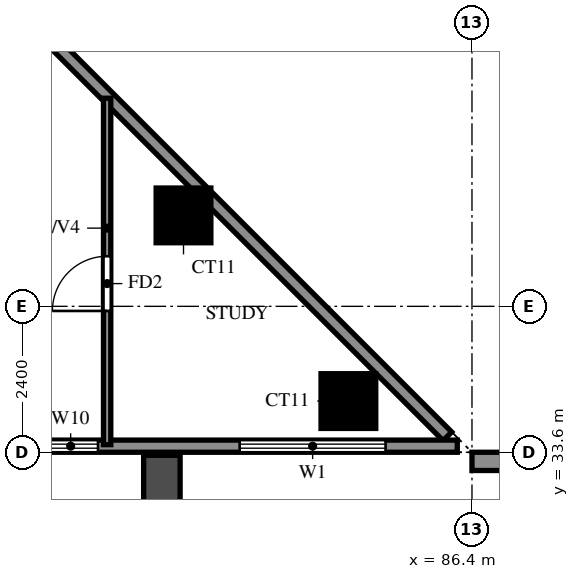
"""IFC4 building model, lengths in metres.
Left out: names, types, materials, properties, quantities, classifications, styles, units other than length and angle.
Written with IfcOpenShell. Run it as: python <this file> out.ifc"""

import sys

from ifc_helpers import new_model, si_unit, direction, frame, frame_2d, origin, origin_2d, place, context, subcontext, project, spatial, rectangle, extrude, source, transform, mapped, element, fill, save


model = new_model("IFC4")
c1 = context("Model", 3, precision=1e-05, world=origin(), true_north=direction((0.0, 1.0)))
c2 = subcontext(c1, "Body", "Model", "MODEL_VIEW")
j1 = project(units=[si_unit("LENGTHUNIT", "METRE"), si_unit("PLANEANGLEUNIT", "RADIAN")], contexts=[c1])
p1 = place(None, origin())
s1 = spatial("IfcSite", under=j1, at=p1, CompositionType="ELEMENT")
p2 = place(p1, origin())
s2 = spatial("IfcBuilding", under=s1, at=p2, CompositionType="ELEMENT")
p3 = place(p2, frame((0.0, 0.0, 100.5)))
s3 = spatial("IfcBuildingStorey", under=s2, at=p3, CompositionType="ELEMENT", Elevation=100.5)
m1 = source(origin(), c2, "Body", "SweptSolid", [
    extrude(rectangle(XDim=0.9, YDim=0.9, at=origin_2d()), origin(), (0.0, 0.0, 1.0), 3.18),
])
for number, where, z_axis, x_axis in (
    (1, (84.367, 34.442, 0.0), (0.0, 0.0, 1.0), (1.0, 0.0, 0.0)),
    (2, (81.656, 37.496, 0.0), (0.0, 0.0, 1.0), (1.0, 0.0, 0.0)),
):
    element("IfcColumn", number, at=place(p3, frame(where, z_axis=z_axis, x_axis=x_axis)), inside=s3, PredefinedType="COLUMN", context=c2, shape_type="MappedRepresentation", body=[
        mapped(m1, transform((0.0, 0.0, 0.0))),
    ])
p4 = place(p3, frame((85.996, 33.863, 0.0), z_axis=(0.0, 0.0, 1.0), x_axis=(-0.707100718496, 0.707112843825, 0.0)))
e3 = element("IfcWall", 3, at=p4, inside=s3, PredefinedType="SOLIDWALL", context=c2, shape_type="SweptSolid", body=[
    extrude(rectangle(XDim=20.135, YDim=0.2, at=frame_2d((10.067, 0.0))), origin(), (0.0, 0.0, 1.0), 3.18),
])
p5 = place(p3, frame((58.8, 33.7, 0.0), z_axis=(0.0, 0.0, 1.0), x_axis=(1.0, 0.0, 0.0)))
e4 = element("IfcWall", 4, at=p5, inside=s3, PredefinedType="SOLIDWALL", context=c2, shape_type="SweptSolid", body=[
    extrude(rectangle(XDim=27.359, YDim=0.2, at=frame_2d((13.679, 0.0))), origin(), (0.0, 0.0, 1.0), 3.18),
])
p6 = place(p5, frame((3.3, 0.0, 0.0)))
e5 = element("IfcOpeningElement", 5, at=p6, cuts=e4, PredefinedType="OPENING", context=c2, shape_type="SweptSolid", body=[
    extrude(rectangle(XDim=1.8, YDim=2.4, at=frame_2d((0.9, 1.2))), frame((0.0, 0.11, 0.0), z_axis=(0.0, -1.0, 0.0), x_axis=(1.0, 0.0, 0.0)), (0.0, 0.0, 1.0), 0.22),
])
p7 = place(p5, frame((18.3, 0.0, 0.0)))
e6 = element("IfcOpeningElement", 6, at=p7, cuts=e4, PredefinedType="OPENING", context=c2, shape_type="SweptSolid", body=[
    extrude(rectangle(XDim=1.8, YDim=2.4, at=frame_2d((0.9, 1.2))), frame((0.0, 0.11, 0.0), z_axis=(0.0, -1.0, 0.0), x_axis=(1.0, 0.0, 0.0)), (0.0, 0.0, 1.0), 0.22),
])
p8 = place(p5, frame((10.0, 0.0, 0.6)))
e7 = element("IfcOpeningElement", 7, at=p8, cuts=e4, PredefinedType="OPENING", context=c2, shape_type="SweptSolid", body=[
    extrude(rectangle(XDim=2.4, YDim=2.4, at=frame_2d((1.2, 1.2))), frame((0.0, 0.11, 0.0), z_axis=(0.0, -1.0, 0.0), x_axis=(1.0, 0.0, 0.0)), (0.0, 0.0, 1.0), 0.22),
])
p9 = place(p5, frame((6.65, 0.0, 1.5)))
e8 = element("IfcOpeningElement", 8, at=p9, cuts=e4, PredefinedType="OPENING", context=c2, shape_type="SweptSolid", body=[
    extrude(rectangle(XDim=0.9, YDim=0.9, at=frame_2d((0.45, 0.45))), frame((0.0, 0.11, 0.0), z_axis=(0.0, -1.0, 0.0), x_axis=(1.0, 0.0, 0.0)), (0.0, 0.0, 1.0), 0.22),
])
p10 = place(p5, frame((8.55, 0.0, 1.5)))
e9 = element("IfcOpeningElement", 9, at=p10, cuts=e4, PredefinedType="OPENING", context=c2, shape_type="SweptSolid", body=[
    extrude(rectangle(XDim=0.9, YDim=0.9, at=frame_2d((0.45, 0.45))), frame((0.0, 0.11, 0.0), z_axis=(0.0, -1.0, 0.0), x_axis=(1.0, 0.0, 0.0)), (0.0, 0.0, 1.0), 0.22),
])
p11 = place(p5, frame((1.95, 0.0, 0.6)))
e10 = element("IfcOpeningElement", 10, at=p11, cuts=e4, PredefinedType="OPENING", context=c2, shape_type="SweptSolid", body=[
    extrude(rectangle(XDim=0.9, YDim=2.4, at=frame_2d((0.45, 1.2))), frame((0.0, 0.11, 0.0), z_axis=(0.0, -1.0, 0.0), x_axis=(1.0, 0.0, 0.0)), (0.0, 0.0, 1.0), 0.22),
])
p12 = place(p5, frame((14.0, 0.0, 0.6)))
e11 = element("IfcOpeningElement", 11, at=p12, cuts=e4, PredefinedType="OPENING", context=c2, shape_type="SweptSolid", body=[
    extrude(rectangle(XDim=1.2, YDim=2.4, at=frame_2d((0.6, 1.2))), frame((0.0, 0.11, 0.0), z_axis=(0.0, -1.0, 0.0), x_axis=(1.0, 0.0, 0.0)), (0.0, 0.0, 1.0), 0.22),
])
p13 = place(p5, frame((16.5, 0.0, 0.6)))
e12 = element("IfcOpeningElement", 12, at=p13, cuts=e4, PredefinedType="OPENING", context=c2, shape_type="SweptSolid", body=[
    extrude(rectangle(XDim=1.2, YDim=2.4, at=frame_2d((0.6, 1.2))), frame((0.0, 0.11, 0.0), z_axis=(0.0, -1.0, 0.0), x_axis=(1.0, 0.0, 0.0)), (0.0, 0.0, 1.0), 0.22),
])
p14 = place(p5, frame((20.55, 0.0, 0.6)))
e13 = element("IfcOpeningElement", 13, at=p14, cuts=e4, PredefinedType="OPENING", context=c2, shape_type="SweptSolid", body=[
    extrude(rectangle(XDim=0.9, YDim=2.4, at=frame_2d((0.45, 1.2))), frame((0.0, 0.11, 0.0), z_axis=(0.0, -1.0, 0.0), x_axis=(1.0, 0.0, 0.0)), (0.0, 0.0, 1.0), 0.22),
])
p15 = place(p5, frame((23.779, 0.0, 0.6)))
e14 = element("IfcOpeningElement", 14, at=p15, cuts=e4, PredefinedType="OPENING", context=c2, shape_type="SweptSolid", body=[
    extrude(rectangle(XDim=2.4, YDim=2.4, at=frame_2d((1.2, 1.2))), frame((0.0, 0.11, 0.0), z_axis=(0.0, -1.0, 0.0), x_axis=(1.0, 0.0, 0.0)), (0.0, 0.0, 1.0), 0.22),
])
p16 = place(p3, frame((86.4, 33.45, -0.32), z_axis=(0.0, 0.0, 1.0), x_axis=(1.0, 0.0, 0.0)))
e15 = element("IfcWall", 15, at=p16, inside=s3, PredefinedType="SOLIDWALL", context=c2, shape_type="SweptSolid", body=[
    extrude(rectangle(XDim=2.4, YDim=0.3, at=frame_2d((1.2, 0.0))), origin(), (0.0, 0.0, 1.0), 3.5),
])
p17 = place(p3, frame((81.3, 33.55, 0.0), z_axis=(0.0, 0.0, 1.0), x_axis=(0.0, -1.0, 0.0)))
e16 = element("IfcWall", 16, at=p17, inside=s3, PredefinedType="SOLIDWALL", context=c2, shape_type="SweptSolid", body=[
    extrude(rectangle(XDim=2.65, YDim=0.6, at=frame_2d((1.325, 0.0))), origin(), (0.0, 0.0, 1.0), 2.85),
])
p18 = place(p3, frame((80.4, 33.725, 0.0), z_axis=(0.0, 0.0, 1.0), x_axis=(0.0, 1.0, 0.0)))
e17 = element("IfcWall", 17, at=p18, inside=s3, PredefinedType="PARTITIONING", context=c2, shape_type="SweptSolid", body=[
    extrude(rectangle(XDim=5.698, YDim=0.12, at=frame_2d((2.849, 0.0))), origin(), (0.0, 0.0, 1.0), 2.28),
])
p19 = place(p18, frame((2.199, 0.0, 0.0)))
e18 = element("IfcOpeningElement", 18, at=p19, cuts=e17, PredefinedType="OPENING", context=c2, shape_type="SweptSolid", body=[
    extrude(rectangle(XDim=0.9, YDim=2.1, at=frame_2d((0.45, 1.05))), frame((0.0, 0.07, 0.0), z_axis=(0.0, -1.0, 0.0), x_axis=(1.0, 0.0, 0.0)), (0.0, 0.0, 1.0), 0.14),
])
p20 = place(p14, origin())
e19 = element("IfcWindow", 19, at=p20, inside=s3, PartitioningType="SINGLE_PANEL", PredefinedType="WINDOW", context=c2, shape_type="SweptSolid", body=[
    extrude(rectangle(XDim=0.9, YDim=2.4, at=frame_2d((0.45, 1.2))), frame((0.0, 0.03, 0.0), z_axis=(0.0, -1.0, 0.0), x_axis=(1.0, 0.0, 0.0)), (0.0, 0.0, 1.0), 0.06),
])
fill(e13, e19)
p21 = place(p15, origin())
e20 = element("IfcWindow", 20, at=p21, inside=s3, PartitioningType="DOUBLE_PANEL_VERTICAL", PredefinedType="WINDOW", context=c2, shape_type="SweptSolid", body=[
    extrude(rectangle(XDim=2.4, YDim=2.4, at=frame_2d((1.2, 1.2))), frame((0.0, 0.03, 0.0), z_axis=(0.0, -1.0, 0.0), x_axis=(1.0, 0.0, 0.0)), (0.0, 0.0, 1.0), 0.06),
])
fill(e14, e20)
p22 = place(p19, origin())
e21 = element("IfcDoor", 21, at=p22, inside=s3, OperationType="SINGLE_SWING_LEFT", PredefinedType="DOOR", context=c2, shape_type="SweptSolid", body=[
    extrude(rectangle(XDim=0.9, YDim=2.1, at=frame_2d((0.45, 1.05))), frame((0.0, 0.025, 0.0), z_axis=(0.0, -1.0, 0.0), x_axis=(1.0, 0.0, 0.0)), (0.0, 0.0, 1.0), 0.05),
])
fill(e18, e21)
save(model, sys.argv[1])
